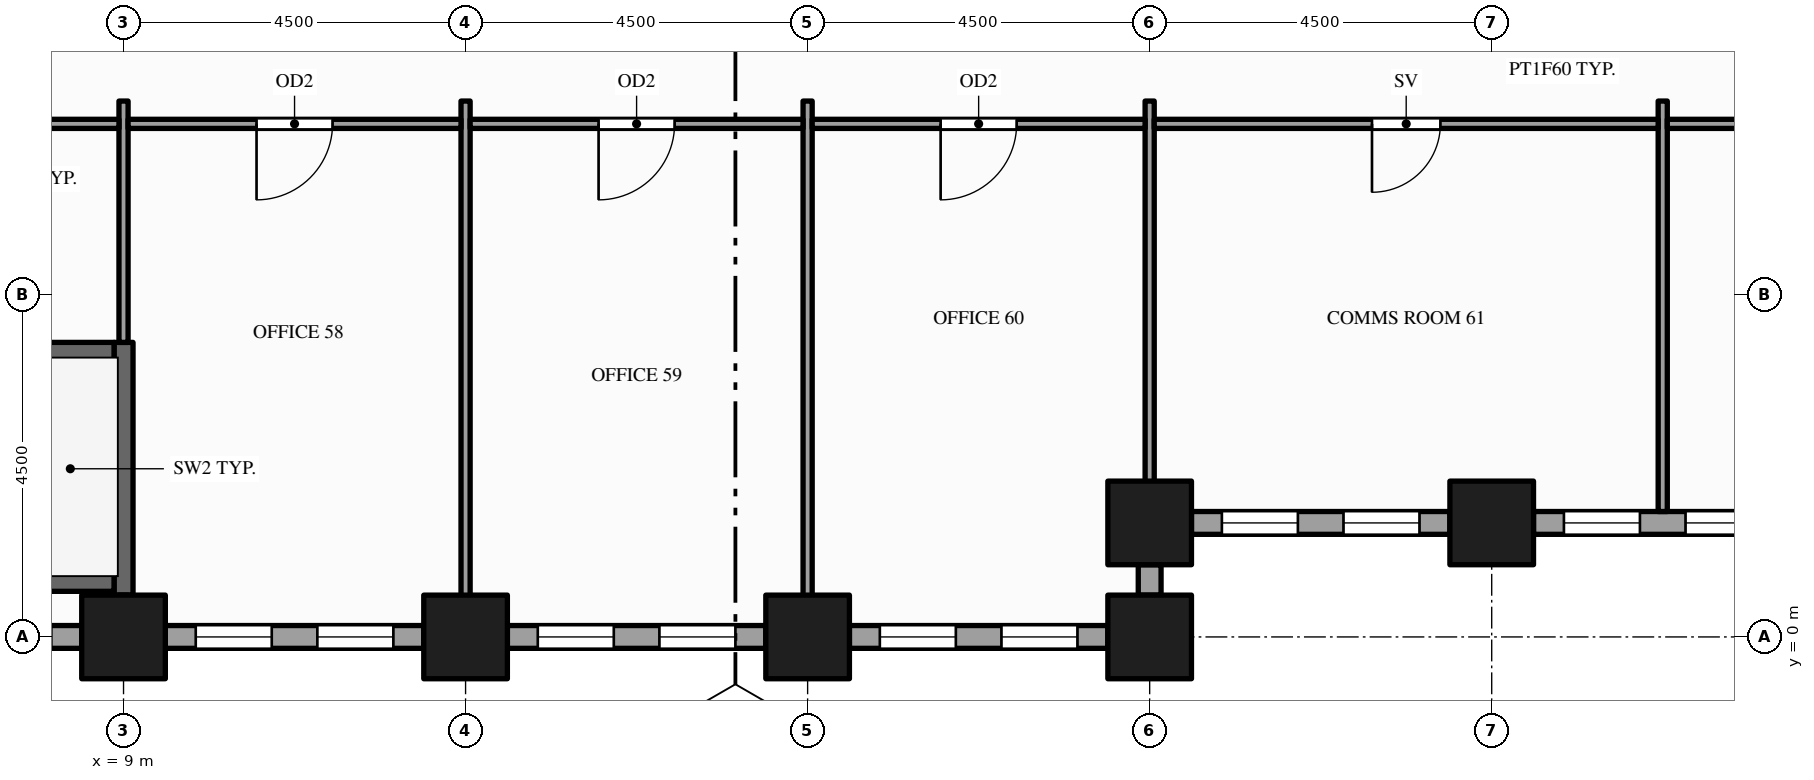
"""IFC4 building model, lengths in metres.
Left out: names, types, materials, properties, quantities, classifications, styles, units other than length and angle.
Written with IfcOpenShell. Run it as: python <this file> out.ifc"""

import sys

from ifc_helpers import new_model, si_unit, direction, frame, frame_2d, origin, origin_2d, place, context, subcontext, project, spatial, rectangle, hollow_rectangle, extrude, element, fill, save


model = new_model("IFC4")
c1 = context("Model", 3, precision=1e-05, world=origin(), true_north=direction((0.0, 1.0)))
c2 = subcontext(c1, "Body", "Model", "MODEL_VIEW")
j1 = project(units=[si_unit("LENGTHUNIT", "METRE"), si_unit("PLANEANGLEUNIT", "RADIAN")], contexts=[c1])
p1 = place(None, origin())
s1 = spatial("IfcSite", under=j1, at=p1, CompositionType="ELEMENT")
p2 = place(p1, origin())
s2 = spatial("IfcBuilding", under=s1, at=p2, CompositionType="ELEMENT")
p3 = place(p2, frame((0.0, 0.0, 49.0)))
s3 = spatial("IfcBuildingStorey", under=s2, at=p3, CompositionType="ELEMENT", Elevation=49.0)
for number, where, z_axis, x_axis in (
    (1, (9.0, 0.0, -0.15), (0.0, 0.0, 1.0), (1.0, 0.0, 0.0)),
    (2, (13.5, 0.0, -0.15), (0.0, 0.0, 1.0), (1.0, 0.0, 0.0)),
    (3, (18.0, 0.0, -0.15), (0.0, 0.0, 1.0), (1.0, 0.0, 0.0)),
    (4, (22.5, 0.0, -0.15), (0.0, 0.0, 1.0), (1.0, 0.0, 0.0)),
    (5, (22.5, 1.5, -0.15), (0.0, 0.0, 1.0), (1.0, 0.0, 0.0)),
    (6, (27.0, 1.5, -0.15), (0.0, 0.0, 1.0), (1.0, 0.0, 0.0)),
):
    element("IfcColumn", number, at=place(p3, frame(where, z_axis=z_axis, x_axis=x_axis)), inside=s3, PredefinedType="COLUMN", context=c2, shape_type="SweptSolid", body=[
        extrude(hollow_rectangle(XDim=1.1, YDim=1.1, WallThickness=0.06, at=origin_2d()), origin(), (0.0, 0.0, 1.0), 4.0),
    ])
p4 = place(p3, frame((5.05, 0.0, 0.0), z_axis=(0.0, 0.0, 1.0), x_axis=(1.0, 0.0, 0.0)))
e7 = element("IfcWall", 7, at=p4, inside=s3, PredefinedType="STANDARD", context=c2, shape_type="SweptSolid", body=[
    extrude(rectangle(XDim=3.4, YDim=0.3, at=frame_2d((1.7, 0.0))), origin(), (0.0, 0.0, 1.0), 3.144),
])
p5 = place(p4, frame((0.4, 0.0, 0.9)))
e8 = element("IfcOpeningElement", 8, at=p5, cuts=e7, PredefinedType="OPENING", context=c2, shape_type="SweptSolid", body=[
    extrude(rectangle(XDim=1.0, YDim=2.0, at=frame_2d((0.5, 1.0))), frame((0.0, 0.16, 0.0), z_axis=(0.0, -1.0, 0.0), x_axis=(1.0, 0.0, 0.0)), (0.0, 0.0, 1.0), 0.32),
])
p6 = place(p4, frame((2.0, 0.0, 0.9)))
e9 = element("IfcOpeningElement", 9, at=p6, cuts=e7, PredefinedType="OPENING", context=c2, shape_type="SweptSolid", body=[
    extrude(rectangle(XDim=1.0, YDim=2.0, at=frame_2d((0.5, 1.0))), frame((0.0, 0.16, 0.0), z_axis=(0.0, -1.0, 0.0), x_axis=(1.0, 0.0, 0.0)), (0.0, 0.0, 1.0), 0.32),
])
p7 = place(p3, frame((9.55, 0.0, 0.0), z_axis=(0.0, 0.0, 1.0), x_axis=(1.0, 0.0, 0.0)))
e10 = element("IfcWall", 10, at=p7, inside=s3, PredefinedType="STANDARD", context=c2, shape_type="SweptSolid", body=[
    extrude(rectangle(XDim=3.4, YDim=0.3, at=frame_2d((1.7, 0.0))), origin(), (0.0, 0.0, 1.0), 3.144),
])
p8 = place(p7, frame((0.4, 0.0, 0.9)))
e11 = element("IfcOpeningElement", 11, at=p8, cuts=e10, PredefinedType="OPENING", context=c2, shape_type="SweptSolid", body=[
    extrude(rectangle(XDim=1.0, YDim=2.0, at=frame_2d((0.5, 1.0))), frame((0.0, 0.16, 0.0), z_axis=(0.0, -1.0, 0.0), x_axis=(1.0, 0.0, 0.0)), (0.0, 0.0, 1.0), 0.32),
])
p9 = place(p7, frame((2.0, 0.0, 0.9)))
e12 = element("IfcOpeningElement", 12, at=p9, cuts=e10, PredefinedType="OPENING", context=c2, shape_type="SweptSolid", body=[
    extrude(rectangle(XDim=1.0, YDim=2.0, at=frame_2d((0.5, 1.0))), frame((0.0, 0.16, 0.0), z_axis=(0.0, -1.0, 0.0), x_axis=(1.0, 0.0, 0.0)), (0.0, 0.0, 1.0), 0.32),
])
p10 = place(p3, frame((14.05, 0.0, 0.0), z_axis=(0.0, 0.0, 1.0), x_axis=(1.0, 0.0, 0.0)))
e13 = element("IfcWall", 13, at=p10, inside=s3, PredefinedType="STANDARD", context=c2, shape_type="SweptSolid", body=[
    extrude(rectangle(XDim=3.4, YDim=0.3, at=frame_2d((1.7, 0.0))), origin(), (0.0, 0.0, 1.0), 3.144),
])
p11 = place(p10, frame((0.4, 0.0, 0.9)))
e14 = element("IfcOpeningElement", 14, at=p11, cuts=e13, PredefinedType="OPENING", context=c2, shape_type="SweptSolid", body=[
    extrude(rectangle(XDim=1.0, YDim=2.0, at=frame_2d((0.5, 1.0))), frame((0.0, 0.16, 0.0), z_axis=(0.0, -1.0, 0.0), x_axis=(1.0, 0.0, 0.0)), (0.0, 0.0, 1.0), 0.32),
])
p12 = place(p10, frame((2.0, 0.0, 0.9)))
e15 = element("IfcOpeningElement", 15, at=p12, cuts=e13, PredefinedType="OPENING", context=c2, shape_type="SweptSolid", body=[
    extrude(rectangle(XDim=1.0, YDim=2.0, at=frame_2d((0.5, 1.0))), frame((0.0, 0.16, 0.0), z_axis=(0.0, -1.0, 0.0), x_axis=(1.0, 0.0, 0.0)), (0.0, 0.0, 1.0), 0.32),
])
p13 = place(p3, frame((18.55, 0.0, 0.0), z_axis=(0.0, 0.0, 1.0), x_axis=(1.0, 0.0, 0.0)))
e16 = element("IfcWall", 16, at=p13, inside=s3, PredefinedType="STANDARD", context=c2, shape_type="SweptSolid", body=[
    extrude(rectangle(XDim=3.4, YDim=0.3, at=frame_2d((1.7, 0.0))), origin(), (0.0, 0.0, 1.0), 3.144),
])
p14 = place(p13, frame((0.4, 0.0, 0.9)))
e17 = element("IfcOpeningElement", 17, at=p14, cuts=e16, PredefinedType="OPENING", context=c2, shape_type="SweptSolid", body=[
    extrude(rectangle(XDim=1.0, YDim=2.0, at=frame_2d((0.5, 1.0))), frame((0.0, 0.16, 0.0), z_axis=(0.0, -1.0, 0.0), x_axis=(1.0, 0.0, 0.0)), (0.0, 0.0, 1.0), 0.32),
])
p15 = place(p13, frame((2.0, 0.0, 0.9)))
e18 = element("IfcOpeningElement", 18, at=p15, cuts=e16, PredefinedType="OPENING", context=c2, shape_type="SweptSolid", body=[
    extrude(rectangle(XDim=1.0, YDim=2.0, at=frame_2d((0.5, 1.0))), frame((0.0, 0.16, 0.0), z_axis=(0.0, -1.0, 0.0), x_axis=(1.0, 0.0, 0.0)), (0.0, 0.0, 1.0), 0.32),
])
p16 = place(p3, frame((22.5, 0.55, 0.0), z_axis=(0.0, 0.0, 1.0), x_axis=(0.0, 1.0, 0.0)))
e19 = element("IfcWall", 19, at=p16, inside=s3, PredefinedType="STANDARD", context=c2, shape_type="SweptSolid", body=[
    extrude(rectangle(XDim=0.4, YDim=0.3, at=frame_2d((0.2, 0.0))), origin(), (0.0, 0.0, 1.0), 3.144),
])
p17 = place(p3, frame((23.05, 1.5, 0.0), z_axis=(0.0, 0.0, 1.0), x_axis=(1.0, 0.0, 0.0)))
e20 = element("IfcWall", 20, at=p17, inside=s3, PredefinedType="STANDARD", context=c2, shape_type="SweptSolid", body=[
    extrude(rectangle(XDim=3.4, YDim=0.3, at=frame_2d((1.7, 0.0))), origin(), (0.0, 0.0, 1.0), 3.144),
])
p18 = place(p17, frame((0.4, 0.0, 0.9)))
e21 = element("IfcOpeningElement", 21, at=p18, cuts=e20, PredefinedType="OPENING", context=c2, shape_type="SweptSolid", body=[
    extrude(rectangle(XDim=1.0, YDim=2.0, at=frame_2d((0.5, 1.0))), frame((0.0, 0.16, 0.0), z_axis=(0.0, -1.0, 0.0), x_axis=(1.0, 0.0, 0.0)), (0.0, 0.0, 1.0), 0.32),
])
p19 = place(p17, frame((2.0, 0.0, 0.9)))
e22 = element("IfcOpeningElement", 22, at=p19, cuts=e20, PredefinedType="OPENING", context=c2, shape_type="SweptSolid", body=[
    extrude(rectangle(XDim=1.0, YDim=2.0, at=frame_2d((0.5, 1.0))), frame((0.0, 0.16, 0.0), z_axis=(0.0, -1.0, 0.0), x_axis=(1.0, 0.0, 0.0)), (0.0, 0.0, 1.0), 0.32),
])
p20 = place(p3, frame((27.55, 1.5, 0.0), z_axis=(0.0, 0.0, 1.0), x_axis=(1.0, 0.0, 0.0)))
e23 = element("IfcWall", 23, at=p20, inside=s3, PredefinedType="STANDARD", context=c2, shape_type="SweptSolid", body=[
    extrude(rectangle(XDim=3.4, YDim=0.3, at=frame_2d((1.7, 0.0))), origin(), (0.0, 0.0, 1.0), 3.144),
])
p21 = place(p20, frame((0.4, 0.0, 0.9)))
e24 = element("IfcOpeningElement", 24, at=p21, cuts=e23, PredefinedType="OPENING", context=c2, shape_type="SweptSolid", body=[
    extrude(rectangle(XDim=1.0, YDim=2.0, at=frame_2d((0.5, 1.0))), frame((0.0, 0.16, 0.0), z_axis=(0.0, -1.0, 0.0), x_axis=(1.0, 0.0, 0.0)), (0.0, 0.0, 1.0), 0.32),
])
p22 = place(p20, frame((2.0, 0.0, 0.9)))
e25 = element("IfcOpeningElement", 25, at=p22, cuts=e23, PredefinedType="OPENING", context=c2, shape_type="SweptSolid", body=[
    extrude(rectangle(XDim=1.0, YDim=2.0, at=frame_2d((0.5, 1.0))), frame((0.0, 0.16, 0.0), z_axis=(0.0, -1.0, 0.0), x_axis=(1.0, 0.0, 0.0)), (0.0, 0.0, 1.0), 0.32),
])
p23 = place(p3, frame((9.0, 0.15, 0.0), z_axis=(0.0, 0.0, 1.0), x_axis=(0.0, 1.0, 0.0)))
e26 = element("IfcWall", 26, at=p23, inside=s3, PredefinedType="PARTITIONING", context=c2, shape_type="SweptSolid", body=[
    extrude(rectangle(XDim=0.4, YDim=0.12, at=frame_2d((0.2, 0.0))), origin(), (0.0, 0.0, 1.0), 3.85),
])
p24 = place(p3, frame((9.0, 0.55, 0.0), z_axis=(0.0, 0.0, 1.0), x_axis=(0.0, 1.0, 0.0)))
e27 = element("IfcWall", 27, at=p24, inside=s3, PredefinedType="SHEAR", context=c2, shape_type="SweptSolid", body=[
    extrude(rectangle(XDim=3.325, YDim=0.25, at=frame_2d((1.663, 0.0))), origin(), (0.0, 0.0, 1.0), 3.85),
])
p25 = place(p3, frame((9.0, 3.875, 0.0), z_axis=(0.0, 0.0, 1.0), x_axis=(0.0, 1.0, 0.0)))
e28 = element("IfcWall", 28, at=p25, inside=s3, PredefinedType="PARTITIONING", context=c2, shape_type="SweptSolid", body=[
    extrude(rectangle(XDim=3.175, YDim=0.12, at=frame_2d((1.587, 0.0))), origin(), (0.0, 0.0, 1.0), 2.938),
])
for number, where, z_axis, x_axis in (
    (29, (13.5, 0.15, 0.0), (0.0, 0.0, 1.0), (0.0, 1.0, 0.0)),
    (30, (18.0, 0.15, 0.0), (0.0, 0.0, 1.0), (0.0, 1.0, 0.0)),
):
    element("IfcWall", number, at=place(p3, frame(where, z_axis=z_axis, x_axis=x_axis)), inside=s3, PredefinedType="PARTITIONING", context=c2, shape_type="SweptSolid", body=[
        extrude(rectangle(XDim=6.9, YDim=0.12, at=frame_2d((3.45, 0.0))), origin(), (0.0, 0.0, 1.0), 2.938),
    ])
for number, where, z_axis, x_axis in (
    (31, (22.5, 1.65, 0.0), (0.0, 0.0, 1.0), (0.0, 1.0, 0.0)),
    (32, (29.25, 1.65, 0.0), (0.0, 0.0, 1.0), (0.0, 1.0, 0.0)),
):
    element("IfcWall", number, at=place(p3, frame(where, z_axis=z_axis, x_axis=x_axis)), inside=s3, PredefinedType="PARTITIONING", context=c2, shape_type="SweptSolid", body=[
        extrude(rectangle(XDim=5.4, YDim=0.12, at=frame_2d((2.7, 0.0))), origin(), (0.0, 0.0, 1.0), 2.938),
    ])
p26 = place(p3, frame((0.85, 0.725, 0.0), z_axis=(0.0, 0.0, 1.0), x_axis=(1.0, 0.0, 0.0)))
e33 = element("IfcWall", 33, at=p26, inside=s3, PredefinedType="SHEAR", context=c2, shape_type="SweptSolid", body=[
    extrude(rectangle(XDim=8.025, YDim=0.25, at=frame_2d((4.012, 0.0))), origin(), (0.0, 0.0, 1.0), 3.85),
])
p27 = place(p3, frame((0.85, 3.75, 0.0), z_axis=(0.0, 0.0, 1.0), x_axis=(1.0, 0.0, 0.0)))
e34 = element("IfcWall", 34, at=p27, inside=s3, PredefinedType="SHEAR", context=c2, shape_type="SweptSolid", body=[
    extrude(rectangle(XDim=8.025, YDim=0.25, at=frame_2d((4.012, 0.0))), origin(), (0.0, 0.0, 1.0), 3.85),
])
p28 = place(p27, frame((0.15, 0.0, 0.0)))
e35 = element("IfcOpeningElement", 35, at=p28, cuts=e34, PredefinedType="OPENING", context=c2, shape_type="SweptSolid", body=[
    extrude(rectangle(XDim=1.1, YDim=2.1, at=frame_2d((0.55, 1.05))), frame((0.0, 0.135, 0.0), z_axis=(0.0, -1.0, 0.0), x_axis=(1.0, 0.0, 0.0)), (0.0, 0.0, 1.0), 0.27),
])
p29 = place(p3, frame((0.15, 6.75, 0.0), z_axis=(0.0, 0.0, 1.0), x_axis=(1.0, 0.0, 0.0)))
e36 = element("IfcWall", 36, at=p29, inside=s3, PredefinedType="PARTITIONING", context=c2, shape_type="SweptSolid", body=[
    extrude(rectangle(XDim=8.79, YDim=0.12, at=frame_2d((4.395, 0.0))), origin(), (0.0, 0.0, 1.0), 2.938),
])
p30 = place(p29, frame((3.805, 0.0, 0.0)))
e37 = element("IfcOpeningElement", 37, at=p30, cuts=e36, PredefinedType="OPENING", context=c2, shape_type="SweptSolid", body=[
    extrude(rectangle(XDim=1.2, YDim=2.1, at=frame_2d((0.6, 1.05))), frame((0.0, 0.07, 0.0), z_axis=(0.0, -1.0, 0.0), x_axis=(1.0, 0.0, 0.0)), (0.0, 0.0, 1.0), 0.14),
])
p31 = place(p3, frame((9.06, 6.75, 0.0), z_axis=(0.0, 0.0, 1.0), x_axis=(1.0, 0.0, 0.0)))
e38 = element("IfcWall", 38, at=p31, inside=s3, PredefinedType="PARTITIONING", context=c2, shape_type="SweptSolid", body=[
    extrude(rectangle(XDim=4.38, YDim=0.12, at=frame_2d((2.19, 0.0))), origin(), (0.0, 0.0, 1.0), 2.938),
])
p32 = place(p31, frame((1.69, 0.0, 0.0)))
e39 = element("IfcOpeningElement", 39, at=p32, cuts=e38, PredefinedType="OPENING", context=c2, shape_type="SweptSolid", body=[
    extrude(rectangle(XDim=1.0, YDim=2.1, at=frame_2d((0.5, 1.05))), frame((0.0, 0.07, 0.0), z_axis=(0.0, -1.0, 0.0), x_axis=(1.0, 0.0, 0.0)), (0.0, 0.0, 1.0), 0.14),
])
p33 = place(p3, frame((13.56, 6.75, 0.0), z_axis=(0.0, 0.0, 1.0), x_axis=(1.0, 0.0, 0.0)))
e40 = element("IfcWall", 40, at=p33, inside=s3, PredefinedType="PARTITIONING", context=c2, shape_type="SweptSolid", body=[
    extrude(rectangle(XDim=4.38, YDim=0.12, at=frame_2d((2.19, 0.0))), origin(), (0.0, 0.0, 1.0), 2.938),
])
p34 = place(p33, frame((1.69, 0.0, 0.0)))
e41 = element("IfcOpeningElement", 41, at=p34, cuts=e40, PredefinedType="OPENING", context=c2, shape_type="SweptSolid", body=[
    extrude(rectangle(XDim=1.0, YDim=2.1, at=frame_2d((0.5, 1.05))), frame((0.0, 0.07, 0.0), z_axis=(0.0, -1.0, 0.0), x_axis=(1.0, 0.0, 0.0)), (0.0, 0.0, 1.0), 0.14),
])
p35 = place(p3, frame((18.06, 6.75, 0.0), z_axis=(0.0, 0.0, 1.0), x_axis=(1.0, 0.0, 0.0)))
e42 = element("IfcWall", 42, at=p35, inside=s3, PredefinedType="PARTITIONING", context=c2, shape_type="SweptSolid", body=[
    extrude(rectangle(XDim=4.38, YDim=0.12, at=frame_2d((2.19, 0.0))), origin(), (0.0, 0.0, 1.0), 2.938),
])
p36 = place(p35, frame((1.69, 0.0, 0.0)))
e43 = element("IfcOpeningElement", 43, at=p36, cuts=e42, PredefinedType="OPENING", context=c2, shape_type="SweptSolid", body=[
    extrude(rectangle(XDim=1.0, YDim=2.1, at=frame_2d((0.5, 1.05))), frame((0.0, 0.07, 0.0), z_axis=(0.0, -1.0, 0.0), x_axis=(1.0, 0.0, 0.0)), (0.0, 0.0, 1.0), 0.14),
])
p37 = place(p3, frame((22.56, 6.75, 0.0), z_axis=(0.0, 0.0, 1.0), x_axis=(1.0, 0.0, 0.0)))
e44 = element("IfcWall", 44, at=p37, inside=s3, PredefinedType="PARTITIONING", context=c2, shape_type="SweptSolid", body=[
    extrude(rectangle(XDim=6.63, YDim=0.12, at=frame_2d((3.315, 0.0))), origin(), (0.0, 0.0, 1.0), 2.938),
])
p38 = place(p37, frame((2.865, 0.0, 0.0)))
e45 = element("IfcOpeningElement", 45, at=p38, cuts=e44, PredefinedType="OPENING", context=c2, shape_type="SweptSolid", body=[
    extrude(rectangle(XDim=0.9, YDim=2.1, at=frame_2d((0.45, 1.05))), frame((0.0, 0.07, 0.0), z_axis=(0.0, -1.0, 0.0), x_axis=(1.0, 0.0, 0.0)), (0.0, 0.0, 1.0), 0.14),
])
p39 = place(p3, frame((29.31, 6.75, 0.0), z_axis=(0.0, 0.0, 1.0), x_axis=(1.0, 0.0, 0.0)))
e46 = element("IfcWall", 46, at=p39, inside=s3, PredefinedType="PARTITIONING", context=c2, shape_type="SweptSolid", body=[
    extrude(rectangle(XDim=4.38, YDim=0.12, at=frame_2d((2.19, 0.0))), origin(), (0.0, 0.0, 1.0), 2.938),
])
p40 = place(p39, frame((1.69, 0.0, 0.0)))
e47 = element("IfcOpeningElement", 47, at=p40, cuts=e46, PredefinedType="OPENING", context=c2, shape_type="SweptSolid", body=[
    extrude(rectangle(XDim=1.0, YDim=2.1, at=frame_2d((0.5, 1.05))), frame((0.0, 0.07, 0.0), z_axis=(0.0, -1.0, 0.0), x_axis=(1.0, 0.0, 0.0)), (0.0, 0.0, 1.0), 0.14),
])
p41 = place(p8, origin())
e48 = element("IfcWindow", 48, at=p41, inside=s3, PartitioningType="SINGLE_PANEL", PredefinedType="WINDOW", context=c2, shape_type="SweptSolid", body=[
    extrude(rectangle(XDim=1.0, YDim=2.0, at=frame_2d((0.5, 1.0))), frame((0.0, 0.03, 0.0), z_axis=(0.0, -1.0, 0.0), x_axis=(1.0, 0.0, 0.0)), (0.0, 0.0, 1.0), 0.06),
])
fill(e11, e48)
p42 = place(p9, origin())
e49 = element("IfcWindow", 49, at=p42, inside=s3, PartitioningType="SINGLE_PANEL", PredefinedType="WINDOW", context=c2, shape_type="SweptSolid", body=[
    extrude(rectangle(XDim=1.0, YDim=2.0, at=frame_2d((0.5, 1.0))), frame((0.0, 0.03, 0.0), z_axis=(0.0, -1.0, 0.0), x_axis=(1.0, 0.0, 0.0)), (0.0, 0.0, 1.0), 0.06),
])
fill(e12, e49)
p43 = place(p11, origin())
e50 = element("IfcWindow", 50, at=p43, inside=s3, PartitioningType="SINGLE_PANEL", PredefinedType="WINDOW", context=c2, shape_type="SweptSolid", body=[
    extrude(rectangle(XDim=1.0, YDim=2.0, at=frame_2d((0.5, 1.0))), frame((0.0, 0.03, 0.0), z_axis=(0.0, -1.0, 0.0), x_axis=(1.0, 0.0, 0.0)), (0.0, 0.0, 1.0), 0.06),
])
fill(e14, e50)
p44 = place(p12, origin())
e51 = element("IfcWindow", 51, at=p44, inside=s3, PartitioningType="SINGLE_PANEL", PredefinedType="WINDOW", context=c2, shape_type="SweptSolid", body=[
    extrude(rectangle(XDim=1.0, YDim=2.0, at=frame_2d((0.5, 1.0))), frame((0.0, 0.03, 0.0), z_axis=(0.0, -1.0, 0.0), x_axis=(1.0, 0.0, 0.0)), (0.0, 0.0, 1.0), 0.06),
])
fill(e15, e51)
p45 = place(p14, origin())
e52 = element("IfcWindow", 52, at=p45, inside=s3, PartitioningType="SINGLE_PANEL", PredefinedType="WINDOW", context=c2, shape_type="SweptSolid", body=[
    extrude(rectangle(XDim=1.0, YDim=2.0, at=frame_2d((0.5, 1.0))), frame((0.0, 0.03, 0.0), z_axis=(0.0, -1.0, 0.0), x_axis=(1.0, 0.0, 0.0)), (0.0, 0.0, 1.0), 0.06),
])
fill(e17, e52)
p46 = place(p15, origin())
e53 = element("IfcWindow", 53, at=p46, inside=s3, PartitioningType="SINGLE_PANEL", PredefinedType="WINDOW", context=c2, shape_type="SweptSolid", body=[
    extrude(rectangle(XDim=1.0, YDim=2.0, at=frame_2d((0.5, 1.0))), frame((0.0, 0.03, 0.0), z_axis=(0.0, -1.0, 0.0), x_axis=(1.0, 0.0, 0.0)), (0.0, 0.0, 1.0), 0.06),
])
fill(e18, e53)
p47 = place(p18, origin())
e54 = element("IfcWindow", 54, at=p47, inside=s3, PartitioningType="SINGLE_PANEL", PredefinedType="WINDOW", context=c2, shape_type="SweptSolid", body=[
    extrude(rectangle(XDim=1.0, YDim=2.0, at=frame_2d((0.5, 1.0))), frame((0.0, 0.03, 0.0), z_axis=(0.0, -1.0, 0.0), x_axis=(1.0, 0.0, 0.0)), (0.0, 0.0, 1.0), 0.06),
])
fill(e21, e54)
p48 = place(p19, origin())
e55 = element("IfcWindow", 55, at=p48, inside=s3, PartitioningType="SINGLE_PANEL", PredefinedType="WINDOW", context=c2, shape_type="SweptSolid", body=[
    extrude(rectangle(XDim=1.0, YDim=2.0, at=frame_2d((0.5, 1.0))), frame((0.0, 0.03, 0.0), z_axis=(0.0, -1.0, 0.0), x_axis=(1.0, 0.0, 0.0)), (0.0, 0.0, 1.0), 0.06),
])
fill(e22, e55)
p49 = place(p21, origin())
e56 = element("IfcWindow", 56, at=p49, inside=s3, PartitioningType="SINGLE_PANEL", PredefinedType="WINDOW", context=c2, shape_type="SweptSolid", body=[
    extrude(rectangle(XDim=1.0, YDim=2.0, at=frame_2d((0.5, 1.0))), frame((0.0, 0.03, 0.0), z_axis=(0.0, -1.0, 0.0), x_axis=(1.0, 0.0, 0.0)), (0.0, 0.0, 1.0), 0.06),
])
fill(e24, e56)
p50 = place(p22, origin())
e57 = element("IfcWindow", 57, at=p50, inside=s3, PartitioningType="SINGLE_PANEL", PredefinedType="WINDOW", context=c2, shape_type="SweptSolid", body=[
    extrude(rectangle(XDim=1.0, YDim=2.0, at=frame_2d((0.5, 1.0))), frame((0.0, 0.03, 0.0), z_axis=(0.0, -1.0, 0.0), x_axis=(1.0, 0.0, 0.0)), (0.0, 0.0, 1.0), 0.06),
])
fill(e25, e57)
p51 = place(p32, origin())
e58 = element("IfcDoor", 58, at=p51, inside=s3, OperationType="SINGLE_SWING_LEFT", PredefinedType="DOOR", context=c2, shape_type="SweptSolid", body=[
    extrude(rectangle(XDim=1.0, YDim=2.1, at=frame_2d((0.5, 1.05))), frame((0.0, 0.025, 0.0), z_axis=(0.0, -1.0, 0.0), x_axis=(1.0, 0.0, 0.0)), (0.0, 0.0, 1.0), 0.05),
])
fill(e39, e58)
p52 = place(p34, origin())
e59 = element("IfcDoor", 59, at=p52, inside=s3, OperationType="SINGLE_SWING_LEFT", PredefinedType="DOOR", context=c2, shape_type="SweptSolid", body=[
    extrude(rectangle(XDim=1.0, YDim=2.1, at=frame_2d((0.5, 1.05))), frame((0.0, 0.025, 0.0), z_axis=(0.0, -1.0, 0.0), x_axis=(1.0, 0.0, 0.0)), (0.0, 0.0, 1.0), 0.05),
])
fill(e41, e59)
p53 = place(p36, origin())
e60 = element("IfcDoor", 60, at=p53, inside=s3, OperationType="SINGLE_SWING_LEFT", PredefinedType="DOOR", context=c2, shape_type="SweptSolid", body=[
    extrude(rectangle(XDim=1.0, YDim=2.1, at=frame_2d((0.5, 1.05))), frame((0.0, 0.025, 0.0), z_axis=(0.0, -1.0, 0.0), x_axis=(1.0, 0.0, 0.0)), (0.0, 0.0, 1.0), 0.05),
])
fill(e43, e60)
p54 = place(p38, origin())
e61 = element("IfcDoor", 61, at=p54, inside=s3, OperationType="SINGLE_SWING_LEFT", PredefinedType="DOOR", context=c2, shape_type="SweptSolid", body=[
    extrude(rectangle(XDim=0.9, YDim=2.1, at=frame_2d((0.45, 1.05))), frame((0.0, 0.025, 0.0), z_axis=(0.0, -1.0, 0.0), x_axis=(1.0, 0.0, 0.0)), (0.0, 0.0, 1.0), 0.05),
])
fill(e45, e61)
save(model, sys.argv[1])
